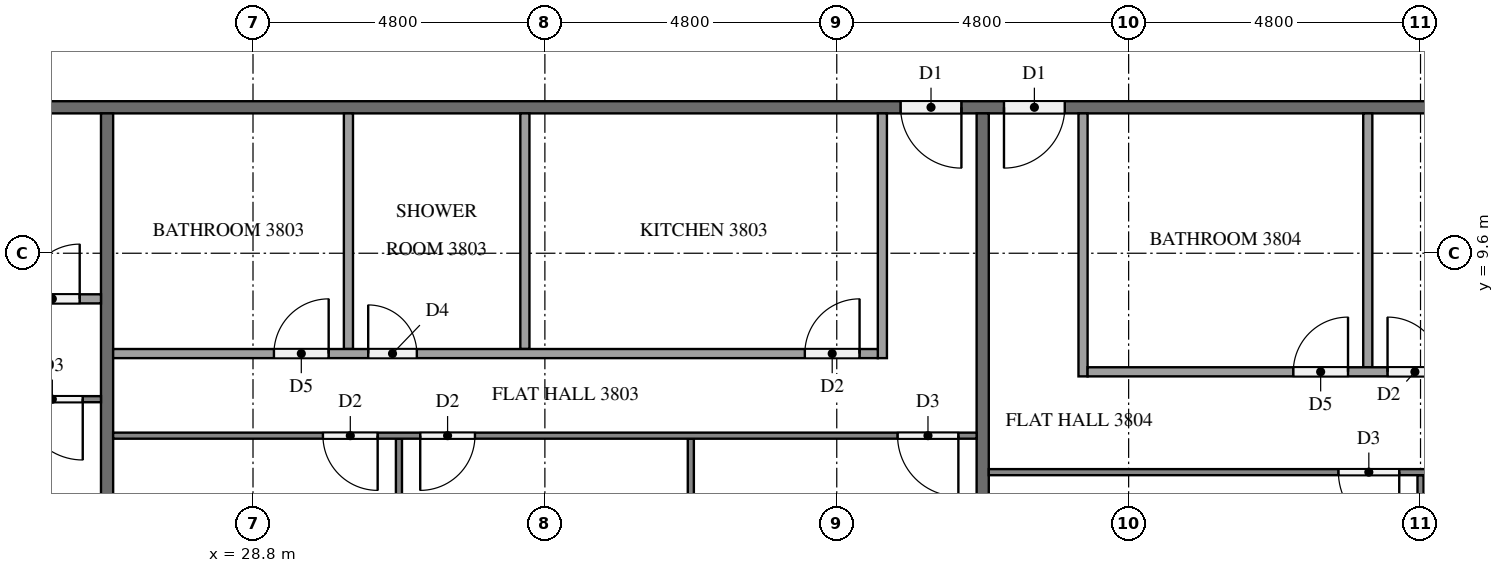
"""IFC4 building model, lengths in metres.
Left out: names, types, materials, properties, quantities, classifications, styles, units other than length and angle.
Written with IfcOpenShell. Run it as: python <this file> out.ifc"""

import sys

from ifc_helpers import new_model, si_unit, direction, frame, frame_2d, origin, place, context, subcontext, project, spatial, rectangle, extrude, element, fill, save


model = new_model("IFC4")
c1 = context("Model", 3, precision=1e-05, world=origin(), true_north=direction((0.0, 1.0)))
c2 = subcontext(c1, "Body", "Model", "MODEL_VIEW")
j1 = project(units=[si_unit("LENGTHUNIT", "METRE"), si_unit("PLANEANGLEUNIT", "RADIAN")], contexts=[c1])
p1 = place(None, origin())
s1 = spatial("IfcSite", under=j1, at=p1, CompositionType="ELEMENT")
p2 = place(p1, origin())
s2 = spatial("IfcBuilding", under=s1, at=p2, CompositionType="ELEMENT")
p3 = place(p2, frame((0.0, 0.0, 149.0)))
s3 = spatial("IfcBuildingStorey", under=s2, at=p3, CompositionType="ELEMENT", Elevation=149.0)
p4 = place(p3, frame((50.5, 12.0, 0.0), z_axis=(0.0, 0.0, 1.0), x_axis=(-1.0, 0.0, 0.0)))
e1 = element("IfcWall", 1, at=p4, inside=s3, PredefinedType="PARTITIONING", context=c2, shape_type="SweptSolid", body=[
    extrude(rectangle(XDim=38.6, YDim=0.2, at=frame_2d((19.3, 0.0))), origin(), (0.0, 0.0, 1.0), 3.2),
])
p5 = place(p4, frame((36.45, 0.0, 0.0)))
e2 = element("IfcOpeningElement", 2, at=p5, cuts=e1, PredefinedType="OPENING", context=c2, shape_type="SweptSolid", body=[
    extrude(rectangle(XDim=1.0, YDim=2.1, at=frame_2d((0.5, 1.05))), frame((0.0, 0.11, 0.0), z_axis=(0.0, -1.0, 0.0), x_axis=(1.0, 0.0, 0.0)), (0.0, 0.0, 1.0), 0.22),
])
p6 = place(p4, frame((34.75, 0.0, 0.0)))
e3 = element("IfcOpeningElement", 3, at=p6, cuts=e1, PredefinedType="OPENING", context=c2, shape_type="SweptSolid", body=[
    extrude(rectangle(XDim=1.0, YDim=2.1, at=frame_2d((0.5, 1.05))), frame((0.0, 0.11, 0.0), z_axis=(0.0, -1.0, 0.0), x_axis=(1.0, 0.0, 0.0)), (0.0, 0.0, 1.0), 0.22),
])
p7 = place(p4, frame((10.05, 0.0, 0.0)))
e4 = element("IfcOpeningElement", 4, at=p7, cuts=e1, PredefinedType="OPENING", context=c2, shape_type="SweptSolid", body=[
    extrude(rectangle(XDim=1.0, YDim=2.1, at=frame_2d((0.5, 1.05))), frame((0.0, 0.11, 0.0), z_axis=(0.0, -1.0, 0.0), x_axis=(1.0, 0.0, 0.0)), (0.0, 0.0, 1.0), 0.22),
])
p8 = place(p4, frame((8.35, 0.0, 0.0)))
e5 = element("IfcOpeningElement", 5, at=p8, cuts=e1, PredefinedType="OPENING", context=c2, shape_type="SweptSolid", body=[
    extrude(rectangle(XDim=1.0, YDim=2.1, at=frame_2d((0.5, 1.05))), frame((0.0, 0.11, 0.0), z_axis=(0.0, -1.0, 0.0), x_axis=(1.0, 0.0, 0.0)), (0.0, 0.0, 1.0), 0.22),
])
for number, where, z_axis, x_axis in (
    (6, (26.4, 11.9, 0.0), (0.0, 0.0, 1.0), (0.0, -1.0, 0.0)),
    (7, (40.8, 11.9, 0.0), (0.0, 0.0, 1.0), (0.0, -1.0, 0.0)),
):
    element("IfcWall", number, at=place(p3, frame(where, z_axis=z_axis, x_axis=x_axis)), inside=s3, PredefinedType="PARTITIONING", context=c2, shape_type="SweptSolid", body=[
        extrude(rectangle(XDim=11.8, YDim=0.2, at=frame_2d((5.9, 0.0))), origin(), (0.0, 0.0, 1.0), 3.2),
    ])
p9 = place(p3, frame((26.3, 7.2, 0.0), z_axis=(0.0, 0.0, 1.0), x_axis=(-1.0, 0.0, 0.0)))
e8 = element("IfcWall", 8, at=p9, inside=s3, PredefinedType="PARTITIONING", context=c2, shape_type="SweptSolid", body=[
    extrude(rectangle(XDim=11.8, YDim=0.1, at=frame_2d((5.9, 0.0))), origin(), (0.0, 0.0, 1.0), 3.2),
])
p10 = place(p9, frame((10.6, 0.0, 0.0)))
e9 = element("IfcOpeningElement", 9, at=p10, cuts=e8, PredefinedType="OPENING", context=c2, shape_type="SweptSolid", body=[
    extrude(rectangle(XDim=0.9, YDim=2.1, at=frame_2d((0.45, 1.05))), frame((0.0, 0.06, 0.0), z_axis=(0.0, -1.0, 0.0), x_axis=(1.0, 0.0, 0.0)), (0.0, 0.0, 1.0), 0.12),
])
p11 = place(p9, frame((0.3, 0.0, 0.0)))
e10 = element("IfcOpeningElement", 10, at=p11, cuts=e8, PredefinedType="OPENING", context=c2, shape_type="SweptSolid", body=[
    extrude(rectangle(XDim=1.0, YDim=2.1, at=frame_2d((0.5, 1.05))), frame((0.0, 0.06, 0.0), z_axis=(0.0, -1.0, 0.0), x_axis=(1.0, 0.0, 0.0)), (0.0, 0.0, 1.0), 0.12),
])
p12 = place(p3, frame((16.125, 8.85, 0.0), z_axis=(0.0, 0.0, 1.0), x_axis=(1.0, 0.0, 0.0)))
e11 = element("IfcWall", 11, at=p12, inside=s3, PredefinedType="PARTITIONING", context=c2, shape_type="SweptSolid", body=[
    extrude(rectangle(XDim=10.175, YDim=0.15, at=frame_2d((5.087, 0.0))), origin(), (0.0, 0.0, 1.0), 3.2),
])
p13 = place(p12, frame((0.3, 0.0, 0.0)))
e12 = element("IfcOpeningElement", 12, at=p13, cuts=e11, PredefinedType="OPENING", context=c2, shape_type="SweptSolid", body=[
    extrude(rectangle(XDim=0.8, YDim=2.1, at=frame_2d((0.4, 1.05))), frame((0.0, 0.085, 0.0), z_axis=(0.0, -1.0, 0.0), x_axis=(1.0, 0.0, 0.0)), (0.0, 0.0, 1.0), 0.17),
])
p14 = place(p12, frame((8.925, 0.0, 0.0)))
e13 = element("IfcOpeningElement", 13, at=p14, cuts=e11, PredefinedType="OPENING", context=c2, shape_type="SweptSolid", body=[
    extrude(rectangle(XDim=0.9, YDim=2.1, at=frame_2d((0.45, 1.05))), frame((0.0, 0.085, 0.0), z_axis=(0.0, -1.0, 0.0), x_axis=(1.0, 0.0, 0.0)), (0.0, 0.0, 1.0), 0.17),
])
for number, where, z_axis, x_axis in (
    (14, (36.0, 6.55, 0.0), (0.0, 0.0, 1.0), (0.0, -1.0, 0.0)),
    (15, (31.2, 6.55, 0.0), (0.0, 0.0, 1.0), (0.0, -1.0, 0.0)),
):
    element("IfcWall", number, at=place(p3, frame(where, z_axis=z_axis, x_axis=x_axis)), inside=s3, PredefinedType="PARTITIONING", context=c2, shape_type="SweptSolid", body=[
        extrude(rectangle(XDim=6.45, YDim=0.1, at=frame_2d((3.225, 0.0))), origin(), (0.0, 0.0, 1.0), 3.2),
    ])
p15 = place(p3, frame((40.7, 6.6, 0.0), z_axis=(0.0, 0.0, 1.0), x_axis=(-1.0, 0.0, 0.0)))
e16 = element("IfcWall", 16, at=p15, inside=s3, PredefinedType="PARTITIONING", context=c2, shape_type="SweptSolid", body=[
    extrude(rectangle(XDim=14.2, YDim=0.1, at=frame_2d((7.1, 0.0))), origin(), (0.0, 0.0, 1.0), 3.2),
])
p16 = place(p15, frame((0.3, 0.0, 0.0)))
e17 = element("IfcOpeningElement", 17, at=p16, cuts=e16, PredefinedType="OPENING", context=c2, shape_type="SweptSolid", body=[
    extrude(rectangle(XDim=1.0, YDim=2.1, at=frame_2d((0.5, 1.05))), frame((0.0, 0.06, 0.0), z_axis=(0.0, -1.0, 0.0), x_axis=(1.0, 0.0, 0.0)), (0.0, 0.0, 1.0), 0.12),
])
p17 = place(p15, frame((8.25, 0.0, 0.0)))
e18 = element("IfcOpeningElement", 18, at=p17, cuts=e16, PredefinedType="OPENING", context=c2, shape_type="SweptSolid", body=[
    extrude(rectangle(XDim=0.9, YDim=2.1, at=frame_2d((0.45, 1.05))), frame((0.0, 0.06, 0.0), z_axis=(0.0, -1.0, 0.0), x_axis=(1.0, 0.0, 0.0)), (0.0, 0.0, 1.0), 0.12),
])
p18 = place(p15, frame((9.85, 0.0, 0.0)))
e19 = element("IfcOpeningElement", 19, at=p18, cuts=e16, PredefinedType="OPENING", context=c2, shape_type="SweptSolid", body=[
    extrude(rectangle(XDim=0.9, YDim=2.1, at=frame_2d((0.45, 1.05))), frame((0.0, 0.06, 0.0), z_axis=(0.0, -1.0, 0.0), x_axis=(1.0, 0.0, 0.0)), (0.0, 0.0, 1.0), 0.12),
])
for number, where, z_axis, x_axis in (
    (20, (33.271, 11.9, 0.0), (0.0, 0.0, 1.0), (0.0, -1.0, 0.0)),
    (21, (30.369, 11.9, 0.0), (0.0, 0.0, 1.0), (0.0, -1.0, 0.0)),
):
    element("IfcWall", number, at=place(p3, frame(where, z_axis=z_axis, x_axis=x_axis)), inside=s3, PredefinedType="PARTITIONING", context=c2, shape_type="SweptSolid", body=[
        extrude(rectangle(XDim=3.875, YDim=0.15, at=frame_2d((1.938, 0.0))), origin(), (0.0, 0.0, 1.0), 3.2),
    ])
p19 = place(p3, frame((39.15, 11.9, 0.0), z_axis=(0.0, 0.0, 1.0), x_axis=(0.0, -1.0, 0.0)))
e22 = element("IfcWall", 22, at=p19, inside=s3, PredefinedType="PARTITIONING", context=c2, shape_type="SweptSolid", body=[
    extrude(rectangle(XDim=4.025, YDim=0.15, at=frame_2d((2.012, 0.0))), origin(), (0.0, 0.0, 1.0), 3.2),
])
p20 = place(p3, frame((26.5, 7.95, 0.0), z_axis=(0.0, 0.0, 1.0), x_axis=(1.0, 0.0, 0.0)))
e23 = element("IfcWall", 23, at=p20, inside=s3, PredefinedType="PARTITIONING", context=c2, shape_type="SweptSolid", body=[
    extrude(rectangle(XDim=12.575, YDim=0.15, at=frame_2d((6.288, 0.0))), origin(), (0.0, 0.0, 1.0), 3.2),
])
p21 = place(p20, frame((11.375, 0.0, 0.0)))
e24 = element("IfcOpeningElement", 24, at=p21, cuts=e23, PredefinedType="OPENING", context=c2, shape_type="SweptSolid", body=[
    extrude(rectangle(XDim=0.9, YDim=2.1, at=frame_2d((0.45, 1.05))), frame((0.0, 0.085, 0.0), z_axis=(0.0, -1.0, 0.0), x_axis=(1.0, 0.0, 0.0)), (0.0, 0.0, 1.0), 0.17),
])
p22 = place(p20, frame((4.194, 0.0, 0.0)))
e25 = element("IfcOpeningElement", 25, at=p22, cuts=e23, PredefinedType="OPENING", context=c2, shape_type="SweptSolid", body=[
    extrude(rectangle(XDim=0.8, YDim=2.1, at=frame_2d((0.4, 1.05))), frame((0.0, 0.085, 0.0), z_axis=(0.0, -1.0, 0.0), x_axis=(1.0, 0.0, 0.0)), (0.0, 0.0, 1.0), 0.17),
])
p23 = place(p20, frame((2.644, 0.0, 0.0)))
e26 = element("IfcOpeningElement", 26, at=p23, cuts=e23, PredefinedType="OPENING", context=c2, shape_type="SweptSolid", body=[
    extrude(rectangle(XDim=0.9, YDim=2.1, at=frame_2d((0.45, 1.05))), frame((0.0, 0.085, 0.0), z_axis=(0.0, -1.0, 0.0), x_axis=(1.0, 0.0, 0.0)), (0.0, 0.0, 1.0), 0.17),
])
p24 = place(p3, frame((48.0, 5.95, 0.0), z_axis=(0.0, 0.0, 1.0), x_axis=(0.0, -1.0, 0.0)))
e27 = element("IfcWall", 27, at=p24, inside=s3, PredefinedType="PARTITIONING", context=c2, shape_type="SweptSolid", body=[
    extrude(rectangle(XDim=5.85, YDim=0.1, at=frame_2d((2.925, 0.0))), origin(), (0.0, 0.0, 1.0), 3.2),
])
p25 = place(p3, frame((57.5, 6.0, 0.0), z_axis=(0.0, 0.0, 1.0), x_axis=(-1.0, 0.0, 0.0)))
e28 = element("IfcWall", 28, at=p25, inside=s3, PredefinedType="PARTITIONING", context=c2, shape_type="SweptSolid", body=[
    extrude(rectangle(XDim=16.6, YDim=0.1, at=frame_2d((8.3, 0.0))), origin(), (0.0, 0.0, 1.0), 3.2),
])
p26 = place(p25, frame((9.85, 0.0, 0.0)))
e29 = element("IfcOpeningElement", 29, at=p26, cuts=e28, PredefinedType="OPENING", context=c2, shape_type="SweptSolid", body=[
    extrude(rectangle(XDim=1.0, YDim=2.1, at=frame_2d((0.5, 1.05))), frame((0.0, 0.06, 0.0), z_axis=(0.0, -1.0, 0.0), x_axis=(1.0, 0.0, 0.0)), (0.0, 0.0, 1.0), 0.12),
])
p27 = place(p25, frame((8.25, 0.0, 0.0)))
e30 = element("IfcOpeningElement", 30, at=p27, cuts=e28, PredefinedType="OPENING", context=c2, shape_type="SweptSolid", body=[
    extrude(rectangle(XDim=0.9, YDim=2.1, at=frame_2d((0.45, 1.05))), frame((0.0, 0.06, 0.0), z_axis=(0.0, -1.0, 0.0), x_axis=(1.0, 0.0, 0.0)), (0.0, 0.0, 1.0), 0.12),
])
p28 = place(p25, frame((0.5, 0.0, 0.0)))
e31 = element("IfcOpeningElement", 31, at=p28, cuts=e28, PredefinedType="OPENING", context=c2, shape_type="SweptSolid", body=[
    extrude(rectangle(XDim=0.9, YDim=2.1, at=frame_2d((0.45, 1.05))), frame((0.0, 0.06, 0.0), z_axis=(0.0, -1.0, 0.0), x_axis=(1.0, 0.0, 0.0)), (0.0, 0.0, 1.0), 0.12),
])
p29 = place(p3, frame((47.133, 11.9, 0.0), z_axis=(0.0, 0.0, 1.0), x_axis=(0.0, -1.0, 0.0)))
e32 = element("IfcWall", 32, at=p29, inside=s3, PredefinedType="PARTITIONING", context=c2, shape_type="SweptSolid", body=[
    extrude(rectangle(XDim=4.175, YDim=0.15, at=frame_2d((2.087, 0.0))), origin(), (0.0, 0.0, 1.0), 3.2),
])
p30 = place(p3, frame((42.45, 11.9, 0.0), z_axis=(0.0, 0.0, 1.0), x_axis=(0.0, -1.0, 0.0)))
e33 = element("IfcWall", 33, at=p30, inside=s3, PredefinedType="PARTITIONING", context=c2, shape_type="SweptSolid", body=[
    extrude(rectangle(XDim=4.325, YDim=0.15, at=frame_2d((2.163, 0.0))), origin(), (0.0, 0.0, 1.0), 3.2),
])
p31 = place(p3, frame((42.525, 7.65, 0.0), z_axis=(0.0, 0.0, 1.0), x_axis=(1.0, 0.0, 0.0)))
e34 = element("IfcWall", 34, at=p31, inside=s3, PredefinedType="PARTITIONING", context=c2, shape_type="SweptSolid", body=[
    extrude(rectangle(XDim=14.975, YDim=0.15, at=frame_2d((7.488, 0.0))), origin(), (0.0, 0.0, 1.0), 3.2),
])
p32 = place(p31, frame((3.383, 0.0, 0.0)))
e35 = element("IfcOpeningElement", 35, at=p32, cuts=e34, PredefinedType="OPENING", context=c2, shape_type="SweptSolid", body=[
    extrude(rectangle(XDim=0.9, YDim=2.1, at=frame_2d((0.45, 1.05))), frame((0.0, 0.085, 0.0), z_axis=(0.0, -1.0, 0.0), x_axis=(1.0, 0.0, 0.0)), (0.0, 0.0, 1.0), 0.17),
])
p33 = place(p31, frame((4.933, 0.0, 0.0)))
e36 = element("IfcOpeningElement", 36, at=p33, cuts=e34, PredefinedType="OPENING", context=c2, shape_type="SweptSolid", body=[
    extrude(rectangle(XDim=0.9, YDim=2.1, at=frame_2d((0.45, 1.05))), frame((0.0, 0.085, 0.0), z_axis=(0.0, -1.0, 0.0), x_axis=(1.0, 0.0, 0.0)), (0.0, 0.0, 1.0), 0.17),
])
p34 = place(p31, frame((13.825, 0.0, 0.0)))
e37 = element("IfcOpeningElement", 37, at=p34, cuts=e34, PredefinedType="OPENING", context=c2, shape_type="SweptSolid", body=[
    extrude(rectangle(XDim=0.8, YDim=2.1, at=frame_2d((0.4, 1.05))), frame((0.0, 0.085, 0.0), z_axis=(0.0, -1.0, 0.0), x_axis=(1.0, 0.0, 0.0)), (0.0, 0.0, 1.0), 0.17),
])
p35 = place(p7, origin())
e38 = element("IfcDoor", 38, at=p35, inside=s3, OperationType="SINGLE_SWING_LEFT", PredefinedType="DOOR", context=c2, shape_type="SweptSolid", body=[
    extrude(rectangle(XDim=1.0, YDim=2.1, at=frame_2d((0.5, 1.05))), frame((0.0, 0.025, 0.0), z_axis=(0.0, -1.0, 0.0), x_axis=(1.0, 0.0, 0.0)), (0.0, 0.0, 1.0), 0.05),
])
fill(e4, e38)
p36 = place(p8, origin())
e39 = element("IfcDoor", 39, at=p36, inside=s3, OperationType="SINGLE_SWING_RIGHT", PredefinedType="DOOR", context=c2, shape_type="SweptSolid", body=[
    extrude(rectangle(XDim=1.0, YDim=2.1, at=frame_2d((0.5, 1.05))), frame((0.0, 0.025, 0.0), z_axis=(0.0, -1.0, 0.0), x_axis=(1.0, 0.0, 0.0)), (0.0, 0.0, 1.0), 0.05),
])
fill(e5, e39)
p37 = place(p11, origin())
e40 = element("IfcDoor", 40, at=p37, inside=s3, OperationType="SINGLE_SWING_LEFT", PredefinedType="DOOR", context=c2, shape_type="SweptSolid", body=[
    extrude(rectangle(XDim=1.0, YDim=2.1, at=frame_2d((0.5, 1.05))), frame((0.0, 0.025, 0.0), z_axis=(0.0, -1.0, 0.0), x_axis=(1.0, 0.0, 0.0)), (0.0, 0.0, 1.0), 0.05),
])
fill(e10, e40)
p38 = place(p14, origin())
e41 = element("IfcDoor", 41, at=p38, inside=s3, OperationType="SINGLE_SWING_RIGHT", PredefinedType="DOOR", context=c2, shape_type="SweptSolid", body=[
    extrude(rectangle(XDim=0.9, YDim=2.1, at=frame_2d((0.45, 1.05))), frame((0.0, 0.025, 0.0), z_axis=(0.0, -1.0, 0.0), x_axis=(1.0, 0.0, 0.0)), (0.0, 0.0, 1.0), 0.05),
])
fill(e13, e41)
p39 = place(p16, origin())
e42 = element("IfcDoor", 42, at=p39, inside=s3, OperationType="SINGLE_SWING_LEFT", PredefinedType="DOOR", context=c2, shape_type="SweptSolid", body=[
    extrude(rectangle(XDim=1.0, YDim=2.1, at=frame_2d((0.5, 1.05))), frame((0.0, 0.025, 0.0), z_axis=(0.0, -1.0, 0.0), x_axis=(1.0, 0.0, 0.0)), (0.0, 0.0, 1.0), 0.05),
])
fill(e17, e42)
p40 = place(p17, origin())
e43 = element("IfcDoor", 43, at=p40, inside=s3, OperationType="SINGLE_SWING_RIGHT", PredefinedType="DOOR", context=c2, shape_type="SweptSolid", body=[
    extrude(rectangle(XDim=0.9, YDim=2.1, at=frame_2d((0.45, 1.05))), frame((0.0, 0.025, 0.0), z_axis=(0.0, -1.0, 0.0), x_axis=(1.0, 0.0, 0.0)), (0.0, 0.0, 1.0), 0.05),
])
fill(e18, e43)
p41 = place(p18, origin())
e44 = element("IfcDoor", 44, at=p41, inside=s3, OperationType="SINGLE_SWING_LEFT", PredefinedType="DOOR", context=c2, shape_type="SweptSolid", body=[
    extrude(rectangle(XDim=0.9, YDim=2.1, at=frame_2d((0.45, 1.05))), frame((0.0, 0.025, 0.0), z_axis=(0.0, -1.0, 0.0), x_axis=(1.0, 0.0, 0.0)), (0.0, 0.0, 1.0), 0.05),
])
fill(e19, e44)
p42 = place(p21, origin())
e45 = element("IfcDoor", 45, at=p42, inside=s3, OperationType="SINGLE_SWING_RIGHT", PredefinedType="DOOR", context=c2, shape_type="SweptSolid", body=[
    extrude(rectangle(XDim=0.9, YDim=2.1, at=frame_2d((0.45, 1.05))), frame((0.0, 0.025, 0.0), z_axis=(0.0, -1.0, 0.0), x_axis=(1.0, 0.0, 0.0)), (0.0, 0.0, 1.0), 0.05),
])
fill(e24, e45)
p43 = place(p22, origin())
e46 = element("IfcDoor", 46, at=p43, inside=s3, OperationType="SINGLE_SWING_LEFT", PredefinedType="DOOR", context=c2, shape_type="SweptSolid", body=[
    extrude(rectangle(XDim=0.8, YDim=2.1, at=frame_2d((0.4, 1.05))), frame((0.0, 0.025, 0.0), z_axis=(0.0, -1.0, 0.0), x_axis=(1.0, 0.0, 0.0)), (0.0, 0.0, 1.0), 0.05),
])
fill(e25, e46)
p44 = place(p23, origin())
e47 = element("IfcDoor", 47, at=p44, inside=s3, OperationType="SINGLE_SWING_RIGHT", PredefinedType="DOOR", context=c2, shape_type="SweptSolid", body=[
    extrude(rectangle(XDim=0.9, YDim=2.1, at=frame_2d((0.45, 1.05))), frame((0.0, 0.025, 0.0), z_axis=(0.0, -1.0, 0.0), x_axis=(1.0, 0.0, 0.0)), (0.0, 0.0, 1.0), 0.05),
])
fill(e26, e47)
p45 = place(p26, origin())
e48 = element("IfcDoor", 48, at=p45, inside=s3, OperationType="SINGLE_SWING_LEFT", PredefinedType="DOOR", context=c2, shape_type="SweptSolid", body=[
    extrude(rectangle(XDim=1.0, YDim=2.1, at=frame_2d((0.5, 1.05))), frame((0.0, 0.025, 0.0), z_axis=(0.0, -1.0, 0.0), x_axis=(1.0, 0.0, 0.0)), (0.0, 0.0, 1.0), 0.05),
])
fill(e29, e48)
p46 = place(p32, origin())
e49 = element("IfcDoor", 49, at=p46, inside=s3, OperationType="SINGLE_SWING_RIGHT", PredefinedType="DOOR", context=c2, shape_type="SweptSolid", body=[
    extrude(rectangle(XDim=0.9, YDim=2.1, at=frame_2d((0.45, 1.05))), frame((0.0, 0.025, 0.0), z_axis=(0.0, -1.0, 0.0), x_axis=(1.0, 0.0, 0.0)), (0.0, 0.0, 1.0), 0.05),
])
fill(e35, e49)
p47 = place(p33, origin())
e50 = element("IfcDoor", 50, at=p47, inside=s3, OperationType="SINGLE_SWING_LEFT", PredefinedType="DOOR", context=c2, shape_type="SweptSolid", body=[
    extrude(rectangle(XDim=0.9, YDim=2.1, at=frame_2d((0.45, 1.05))), frame((0.0, 0.025, 0.0), z_axis=(0.0, -1.0, 0.0), x_axis=(1.0, 0.0, 0.0)), (0.0, 0.0, 1.0), 0.05),
])
fill(e36, e50)
save(model, sys.argv[1])
